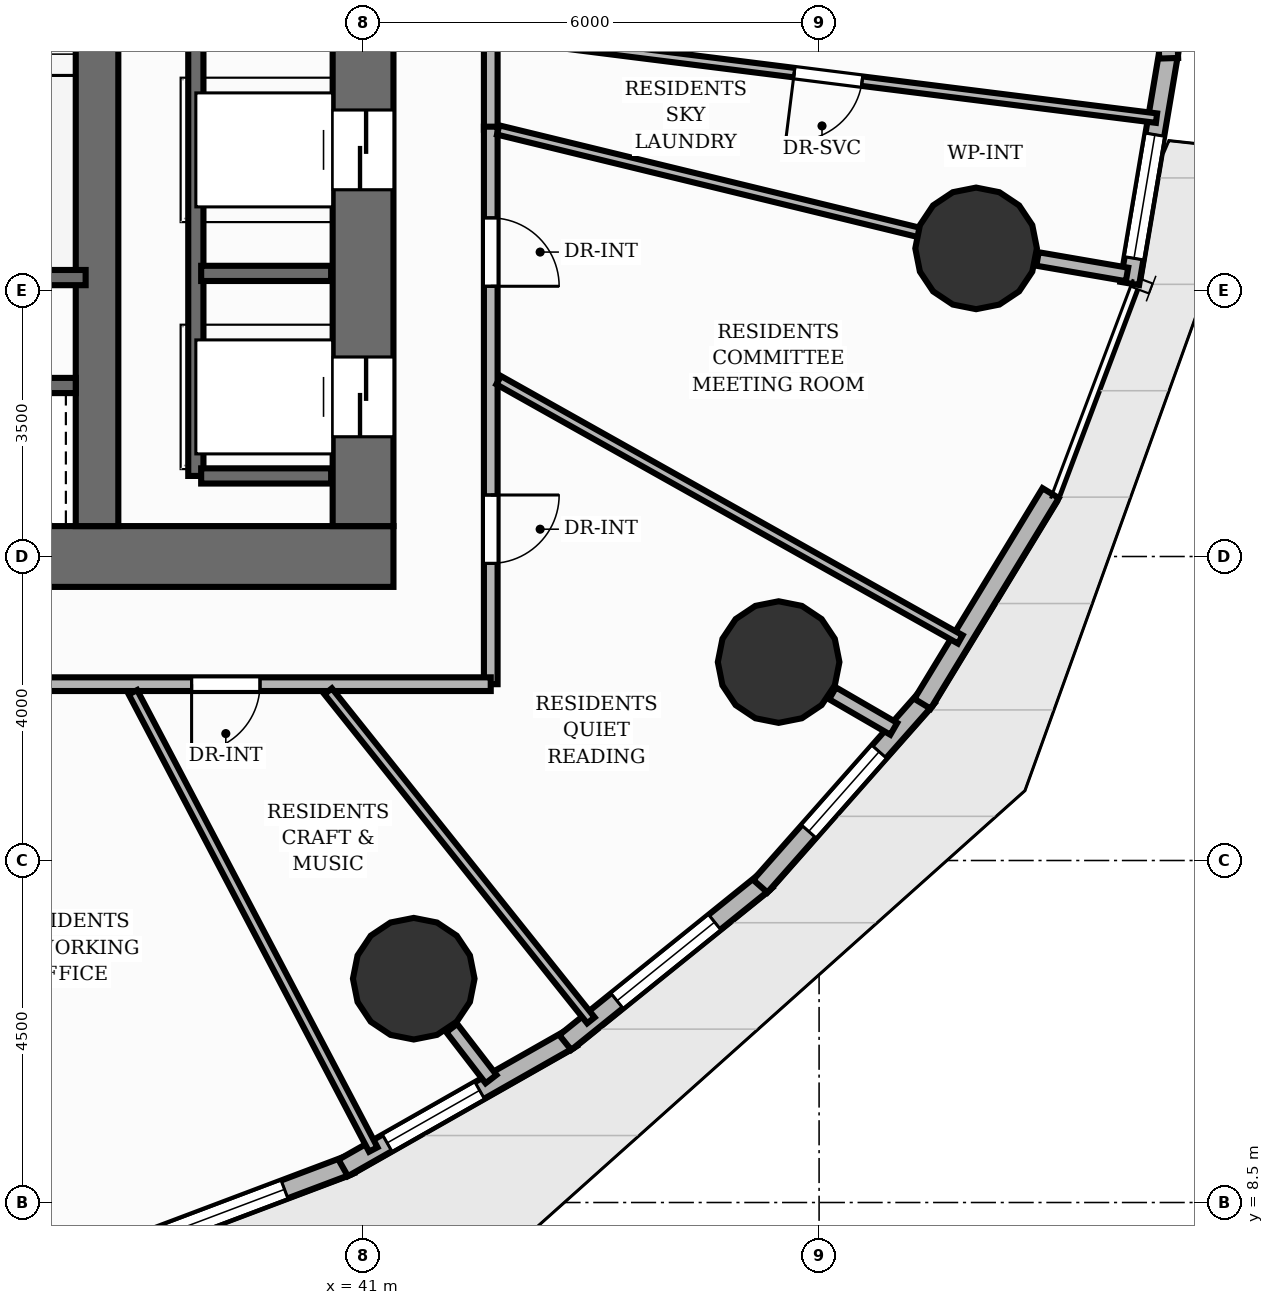
"""IFC4 building model, lengths in metres.
Left out: names, types, materials, properties, quantities, classifications, styles, units other than length and angle.
Written with IfcOpenShell. Run it as: python <this file> out.ifc"""

import sys

from ifc_helpers import new_model, si_unit, direction, frame, frame_2d, origin, origin_2d, place, context, subcontext, project, spatial, rectangle, circle, extrude, element, fill, save


model = new_model("IFC4")
c1 = context("Model", 3, precision=1e-05, world=origin(), true_north=direction((0.0, 1.0)))
c2 = subcontext(c1, "Body", "Model", "MODEL_VIEW")
j1 = project(units=[si_unit("LENGTHUNIT", "METRE"), si_unit("PLANEANGLEUNIT", "RADIAN")], contexts=[c1])
p1 = place(None, origin())
s1 = spatial("IfcSite", under=j1, at=p1, CompositionType="ELEMENT")
p2 = place(p1, origin())
s2 = spatial("IfcBuilding", under=s1, at=p2, CompositionType="ELEMENT")
p3 = place(p2, frame((0.0, 0.0, 40.8)))
s3 = spatial("IfcBuildingStorey", under=s2, at=p3, CompositionType="ELEMENT", Elevation=40.8)
p4 = place(p3, frame((22.6, 17.0, 0.0), z_axis=(0.0, 0.0, 1.0), x_axis=(1.0, 0.0, 0.0)))
e1 = element("IfcWall", 1, at=p4, inside=s3, PredefinedType="SHEAR", context=c2, shape_type="SweptSolid", body=[
    extrude(rectangle(XDim=18.8, YDim=0.8, at=frame_2d((9.4, 0.0))), origin(), (0.0, 0.0, 1.0), 3.2),
])
p5 = place(p4, frame((5.9, 0.0, 0.0)))
e2 = element("IfcOpeningElement", 2, at=p5, cuts=e1, PredefinedType="OPENING", context=c2, shape_type="SweptSolid", body=[
    extrude(rectangle(XDim=1.1, YDim=2.15, at=frame_2d((0.55, 1.075))), frame((0.0, 0.41, 0.0), z_axis=(0.0, -1.0, 0.0), x_axis=(1.0, 0.0, 0.0)), (0.0, 0.0, 1.0), 0.82),
])
p6 = place(p4, frame((9.45, 0.0, 0.0)))
e3 = element("IfcOpeningElement", 3, at=p6, cuts=e1, PredefinedType="OPENING", context=c2, shape_type="SweptSolid", body=[
    extrude(rectangle(XDim=0.9, YDim=2.1, at=frame_2d((0.45, 1.05))), frame((0.0, 0.41, 0.0), z_axis=(0.0, -1.0, 0.0), x_axis=(1.0, 0.0, 0.0)), (0.0, 0.0, 1.0), 0.82),
])
p7 = place(p3, frame((41.0, 17.4, 0.0), z_axis=(0.0, 0.0, 1.0), x_axis=(0.0, 1.0, 0.0)))
e4 = element("IfcWall", 4, at=p7, inside=s3, PredefinedType="SHEAR", context=c2, shape_type="SweptSolid", body=[
    extrude(rectangle(XDim=13.2, YDim=0.8, at=frame_2d((6.6, 0.0))), origin(), (0.0, 0.0, 1.0), 3.2),
])
p8 = place(p7, frame((1.175, 0.0, 0.0)))
e5 = element("IfcOpeningElement", 5, at=p8, cuts=e4, PredefinedType="OPENING", context=c2, shape_type="SweptSolid", body=[
    extrude(rectangle(XDim=1.05, YDim=2.15, at=frame_2d((0.525, 1.075))), frame((0.0, 0.41, 0.0), z_axis=(0.0, -1.0, 0.0), x_axis=(1.0, 0.0, 0.0)), (0.0, 0.0, 1.0), 0.82),
])
p9 = place(p7, frame((4.425, 0.0, 0.0)))
e6 = element("IfcOpeningElement", 6, at=p9, cuts=e4, PredefinedType="OPENING", context=c2, shape_type="SweptSolid", body=[
    extrude(rectangle(XDim=1.05, YDim=2.15, at=frame_2d((0.525, 1.075))), frame((0.0, 0.41, 0.0), z_axis=(0.0, -1.0, 0.0), x_axis=(1.0, 0.0, 0.0)), (0.0, 0.0, 1.0), 0.82),
])
p10 = place(p7, frame((7.725, 0.0, 0.0)))
e7 = element("IfcOpeningElement", 7, at=p10, cuts=e4, PredefinedType="OPENING", context=c2, shape_type="SweptSolid", body=[
    extrude(rectangle(XDim=1.05, YDim=2.15, at=frame_2d((0.525, 1.075))), frame((0.0, 0.41, 0.0), z_axis=(0.0, -1.0, 0.0), x_axis=(1.0, 0.0, 0.0)), (0.0, 0.0, 1.0), 0.82),
])
p11 = place(p7, frame((10.975, 0.0, 0.0)))
e8 = element("IfcOpeningElement", 8, at=p11, cuts=e4, PredefinedType="OPENING", context=c2, shape_type="SweptSolid", body=[
    extrude(rectangle(XDim=1.05, YDim=2.15, at=frame_2d((0.525, 1.075))), frame((0.0, 0.41, 0.0), z_axis=(0.0, -1.0, 0.0), x_axis=(1.0, 0.0, 0.0)), (0.0, 0.0, 1.0), 0.82),
])
p12 = place(p3, frame((37.5, 17.4, 0.0), z_axis=(0.0, 0.0, 1.0), x_axis=(0.0, 1.0, 0.0)))
e9 = element("IfcWall", 9, at=p12, inside=s3, PredefinedType="SHEAR", context=c2, shape_type="SweptSolid", body=[
    extrude(rectangle(XDim=13.2, YDim=0.56, at=frame_2d((6.6, 0.0))), origin(), (0.0, 0.0, 1.0), 3.2),
])
for number, where, z_axis, x_axis in (
    (10, (41.667, 11.445, 0.0), (0.0, 0.0, 1.0), (1.0, 0.0, 0.0)),
    (11, (46.468, 15.611, 0.0), (0.0, 0.0, 1.0), (1.0, 0.0, 0.0)),
    (12, (49.066, 21.054, 0.0), (0.0, 0.0, 1.0), (1.0, 0.0, 0.0)),
):
    element("IfcColumn", number, at=place(p3, frame(where, z_axis=z_axis, x_axis=x_axis)), inside=s3, PredefinedType="COLUMN", context=c2, shape_type="SweptSolid", body=[
        extrude(circle(Radius=0.8, at=origin_2d()), origin(), (0.0, 0.0, 1.0), 3.2),
    ])
p13 = place(p3, frame((40.838, 9.001, 0.0), z_axis=(0.0, 0.0, 1.0), x_axis=(-0.935679231508, -0.352851775857, 0.0)))
e13 = element("IfcWall", 13, at=p13, inside=s3, PredefinedType="SOLIDWALL", context=c2, shape_type="SweptSolid", body=[
    extrude(rectangle(XDim=3.513, YDim=0.25, at=frame_2d((1.756, 0.0))), origin(), (0.0, 0.0, 1.0), 2.96),
])
p14 = place(p13, frame((0.931, 0.0, 0.85)))
e14 = element("IfcOpeningElement", 14, at=p14, cuts=e13, PredefinedType="OPENING", context=c2, shape_type="SweptSolid", body=[
    extrude(rectangle(XDim=1.65, YDim=1.55, at=frame_2d((0.825, 0.775))), frame((0.0, 0.135, 0.0), z_axis=(0.0, -1.0, 0.0), x_axis=(1.0, 0.0, 0.0)), (0.0, 0.0, 1.0), 0.27),
])
p15 = place(p3, frame((43.751, 10.667, 0.0), z_axis=(0.0, 0.0, 1.0), x_axis=(-0.869389832426, -0.494126825091, 0.0)))
e15 = element("IfcWall", 15, at=p15, inside=s3, PredefinedType="SOLIDWALL", context=c2, shape_type="SweptSolid", body=[
    extrude(rectangle(XDim=3.465, YDim=0.25, at=frame_2d((1.732, 0.0))), origin(), (0.0, 0.0, 1.0), 2.96),
])
p16 = place(p15, frame((1.4, 0.0, 0.85)))
e16 = element("IfcOpeningElement", 16, at=p16, cuts=e15, PredefinedType="OPENING", context=c2, shape_type="SweptSolid", body=[
    extrude(rectangle(XDim=1.4, YDim=1.29, at=frame_2d((0.7, 0.645))), frame((0.0, 0.135, 0.0), z_axis=(0.0, -1.0, 0.0), x_axis=(1.0, 0.0, 0.0)), (0.0, 0.0, 1.0), 0.27),
])
p17 = place(p3, frame((46.307, 12.739, 0.0), z_axis=(0.0, 0.0, 1.0), x_axis=(-0.778586232895, -0.627537630701, 0.0)))
e17 = element("IfcWall", 17, at=p17, inside=s3, PredefinedType="SOLIDWALL", context=c2, shape_type="SweptSolid", body=[
    extrude(rectangle(XDim=3.399, YDim=0.25, at=frame_2d((1.7, 0.0))), origin(), (0.0, 0.0, 1.0), 2.96),
])
p18 = place(p17, frame((0.875, 0.0, 0.85)))
e18 = element("IfcOpeningElement", 18, at=p18, cuts=e17, PredefinedType="OPENING", context=c2, shape_type="SweptSolid", body=[
    extrude(rectangle(XDim=1.65, YDim=1.55, at=frame_2d((0.825, 0.775))), frame((0.0, 0.135, 0.0), z_axis=(0.0, -1.0, 0.0), x_axis=(1.0, 0.0, 0.0)), (0.0, 0.0, 1.0), 0.27),
])
p19 = place(p3, frame((48.427, 15.152, 0.0), z_axis=(0.0, 0.0, 1.0), x_axis=(-0.662112398544, -0.749404544751, 0.0)))
e19 = element("IfcWall", 19, at=p19, inside=s3, PredefinedType="SOLIDWALL", context=c2, shape_type="SweptSolid", body=[
    extrude(rectangle(XDim=3.323, YDim=0.25, at=frame_2d((1.661, 0.0))), origin(), (0.0, 0.0, 1.0), 2.96),
])
p20 = place(p19, frame((0.961, 0.0, 0.85)))
e20 = element("IfcOpeningElement", 20, at=p20, cuts=e19, PredefinedType="OPENING", context=c2, shape_type="SweptSolid", body=[
    extrude(rectangle(XDim=1.4, YDim=1.55, at=frame_2d((0.7, 0.775))), frame((0.0, 0.135, 0.0), z_axis=(0.0, -1.0, 0.0), x_axis=(1.0, 0.0, 0.0)), (0.0, 0.0, 1.0), 0.27),
])
p21 = place(p3, frame((50.046, 17.834, 0.0), z_axis=(0.0, 0.0, 1.0), x_axis=(-0.519753566346, -0.854316235519, 0.0)))
e21 = element("IfcWall", 21, at=p21, inside=s3, PredefinedType="SOLIDWALL", context=c2, shape_type="SweptSolid", body=[
    extrude(rectangle(XDim=3.244, YDim=0.25, at=frame_2d((1.622, 0.0))), origin(), (0.0, 0.0, 1.0), 2.96),
])
p22 = place(p3, frame((51.607, 23.67, 0.0), z_axis=(0.0, 0.0, 1.0), x_axis=(-0.166403122634, -0.98605780803, 0.0)))
e22 = element("IfcWall", 22, at=p22, inside=s3, PredefinedType="SOLIDWALL", context=c2, shape_type="SweptSolid", body=[
    extrude(rectangle(XDim=3.121, YDim=0.25, at=frame_2d((1.56, 0.0))), origin(), (0.0, 0.0, 1.0), 2.96),
])
p23 = place(p22, frame((1.135, 0.0, 0.85)))
e23 = element("IfcOpeningElement", 23, at=p23, cuts=e22, PredefinedType="OPENING", context=c2, shape_type="SweptSolid", body=[
    extrude(rectangle(XDim=1.65, YDim=1.29, at=frame_2d((0.825, 0.645))), frame((0.0, 0.135, 0.0), z_axis=(0.0, -1.0, 0.0), x_axis=(1.0, 0.0, 0.0)), (0.0, 0.0, 1.0), 0.27),
])
p24 = place(p3, frame((51.501, 26.646, 0.0), z_axis=(0.0, 0.0, 1.0), x_axis=(0.031584802517, -0.999501075662, 0.0)))
e24 = element("IfcWall", 24, at=p24, inside=s3, PredefinedType="SOLIDWALL", context=c2, shape_type="SweptSolid", body=[
    extrude(rectangle(XDim=3.092, YDim=0.25, at=frame_2d((1.546, 0.0))), origin(), (0.0, 0.0, 1.0), 2.96),
])
p25 = place(p24, frame((0.721, 0.0, 0.85)))
e25 = element("IfcOpeningElement", 25, at=p25, cuts=e24, PredefinedType="OPENING", context=c2, shape_type="SweptSolid", body=[
    extrude(rectangle(XDim=1.65, YDim=1.55, at=frame_2d((0.825, 0.775))), frame((0.0, 0.135, 0.0), z_axis=(0.0, -1.0, 0.0), x_axis=(1.0, 0.0, 0.0)), (0.0, 0.0, 1.0), 0.27),
])
p26 = place(p3, frame((34.11, 20.67, 0.0), z_axis=(0.0, 0.0, 1.0), x_axis=(1.0, 0.0, 0.0)))
e26 = element("IfcWall", 26, at=p26, inside=s3, PredefinedType="SHEAR", context=c2, shape_type="SweptSolid", body=[
    extrude(rectangle(XDim=3.24, YDim=0.2, at=frame_2d((1.62, 0.0))), origin(), (0.0, 0.0, 1.0), 3.2),
])
p27 = place(p3, frame((38.8, 18.06, 0.0), z_axis=(0.0, 0.0, 1.0), x_axis=(0.0, 1.0, 0.0)))
e27 = element("IfcWall", 27, at=p27, inside=s3, PredefinedType="SHEAR", context=c2, shape_type="SweptSolid", body=[
    extrude(rectangle(XDim=11.88, YDim=0.2, at=frame_2d((5.94, 0.0))), origin(), (0.0, 0.0, 1.0), 3.2),
])
for number, where, z_axis, x_axis in (
    (28, (38.87, 18.06, 0.0), (0.0, 0.0, 1.0), (1.0, 0.0, 0.0)),
    (29, (38.87, 20.725, 0.0), (0.0, 0.0, 1.0), (1.0, 0.0, 0.0)),
):
    element("IfcWall", number, at=place(p3, frame(where, z_axis=z_axis, x_axis=x_axis)), inside=s3, PredefinedType="SHEAR", context=c2, shape_type="SweptSolid", body=[
        extrude(rectangle(XDim=1.71, YDim=0.2, at=frame_2d((0.855, 0.0))), origin(), (0.0, 0.0, 1.0), 3.2),
    ])
p28 = place(p3, frame((33.5, 19.25, 0.0), z_axis=(0.0, 0.0, 1.0), x_axis=(1.0, 0.0, 0.0)))
e30 = element("IfcWall", 30, at=p28, inside=s3, PredefinedType="SHEAR", context=c2, shape_type="SweptSolid", body=[
    extrude(rectangle(XDim=3.72, YDim=0.2, at=frame_2d((1.86, 0.0))), origin(), (0.0, 0.0, 1.0), 3.2),
])
p29 = place(p3, frame((42.167, 10.795, 0.0), z_axis=(0.0, 0.0, 1.0), x_axis=(0.609822176225, -0.792538272504, 0.0)))
e31 = element("IfcWall", 31, at=p29, inside=s3, PredefinedType="PARTITIONING", context=c2, shape_type="SweptSolid", body=[
    extrude(rectangle(XDim=0.847, YDim=0.18, at=frame_2d((0.424, 0.0))), origin(), (0.0, 0.0, 1.0), 2.178),
])
p30 = place(p3, frame((47.177, 15.2, 0.0), z_axis=(0.0, 0.0, 1.0), x_axis=(0.864965183009, -0.501831876411, 0.0)))
e32 = element("IfcWall", 32, at=p30, inside=s3, PredefinedType="PARTITIONING", context=c2, shape_type="SweptSolid", body=[
    extrude(rectangle(XDim=0.931, YDim=0.18, at=frame_2d((0.466, 0.0))), origin(), (0.0, 0.0, 1.0), 2.178),
])
p31 = place(p3, frame((49.874, 20.915, 0.0), z_axis=(0.0, 0.0, 1.0), x_axis=(0.98541644509, -0.170160012181, 0.0)))
e33 = element("IfcWall", 33, at=p31, inside=s3, PredefinedType="PARTITIONING", context=c2, shape_type="SweptSolid", body=[
    extrude(rectangle(XDim=1.195, YDim=0.18, at=frame_2d((0.598, 0.0))), origin(), (0.0, 0.0, 1.0), 2.178),
])
p32 = place(p3, frame((42.68, 32.68, 0.0), z_axis=(0.0, 0.0, 1.0), x_axis=(0.0, -1.0, 0.0)))
e34 = element("IfcWall", 34, at=p32, inside=s3, PredefinedType="PARTITIONING", context=c2, shape_type="SweptSolid", body=[
    extrude(rectangle(XDim=10.065, YDim=0.18, at=frame_2d((5.032, 0.0))), origin(), (0.0, 0.0, 1.0), 2.955),
])
p33 = place(p32, frame((7.374, 0.0, 0.0)))
e35 = element("IfcOpeningElement", 35, at=p33, cuts=e34, PredefinedType="OPENING", context=c2, shape_type="SweptSolid", body=[
    extrude(rectangle(XDim=0.9, YDim=2.1, at=frame_2d((0.45, 1.05))), frame((0.0, 0.1, 0.0), z_axis=(0.0, -1.0, 0.0), x_axis=(1.0, 0.0, 0.0)), (0.0, 0.0, 1.0), 0.2),
])
p34 = place(p3, frame((42.68, 22.656, 0.0), z_axis=(0.0, 0.0, 1.0), x_axis=(0.0, -1.0, 0.0)))
e36 = element("IfcWall", 36, at=p34, inside=s3, PredefinedType="PARTITIONING", context=c2, shape_type="SweptSolid", body=[
    extrude(rectangle(XDim=7.335, YDim=0.18, at=frame_2d((3.668, 0.0))), origin(), (0.0, 0.0, 1.0), 2.955),
])
p35 = place(p34, frame((1.2, 0.0, 0.0)))
e37 = element("IfcOpeningElement", 37, at=p35, cuts=e36, PredefinedType="OPENING", context=c2, shape_type="SweptSolid", body=[
    extrude(rectangle(XDim=0.9, YDim=2.1, at=frame_2d((0.45, 1.05))), frame((0.0, 0.1, 0.0), z_axis=(0.0, -1.0, 0.0), x_axis=(1.0, 0.0, 0.0)), (0.0, 0.0, 1.0), 0.2),
])
p36 = place(p34, frame((4.846, 0.0, 0.0)))
e38 = element("IfcOpeningElement", 38, at=p36, cuts=e36, PredefinedType="OPENING", context=c2, shape_type="SweptSolid", body=[
    extrude(rectangle(XDim=0.9, YDim=2.1, at=frame_2d((0.45, 1.05))), frame((0.0, 0.1, 0.0), z_axis=(0.0, -1.0, 0.0), x_axis=(1.0, 0.0, 0.0)), (0.0, 0.0, 1.0), 0.2),
])
p37 = place(p3, frame((42.68, 15.32, 0.0), z_axis=(0.0, 0.0, 1.0), x_axis=(-1.0, 0.0, 0.0)))
e39 = element("IfcWall", 39, at=p37, inside=s3, PredefinedType="PARTITIONING", context=c2, shape_type="SweptSolid", body=[
    extrude(rectangle(XDim=21.36, YDim=0.18, at=frame_2d((10.68, 0.0))), origin(), (0.0, 0.0, 1.0), 2.955),
])
p38 = place(p37, frame((3.036, 0.0, 0.0)))
e40 = element("IfcOpeningElement", 40, at=p38, cuts=e39, PredefinedType="OPENING", context=c2, shape_type="SweptSolid", body=[
    extrude(rectangle(XDim=0.9, YDim=2.1, at=frame_2d((0.45, 1.05))), frame((0.0, 0.1, 0.0), z_axis=(0.0, -1.0, 0.0), x_axis=(1.0, 0.0, 0.0)), (0.0, 0.0, 1.0), 0.2),
])
p39 = place(p37, frame((6.275, 0.0, 0.0)))
e41 = element("IfcOpeningElement", 41, at=p39, cuts=e39, PredefinedType="OPENING", context=c2, shape_type="SweptSolid", body=[
    extrude(rectangle(XDim=0.9, YDim=2.1, at=frame_2d((0.45, 1.05))), frame((0.0, 0.1, 0.0), z_axis=(0.0, -1.0, 0.0), x_axis=(1.0, 0.0, 0.0)), (0.0, 0.0, 1.0), 0.2),
])
p40 = place(p37, frame((14.49, 0.0, 0.0)))
e42 = element("IfcOpeningElement", 42, at=p40, cuts=e39, PredefinedType="OPENING", context=c2, shape_type="SweptSolid", body=[
    extrude(rectangle(XDim=1.05, YDim=2.15, at=frame_2d((0.525, 1.075))), frame((0.0, 0.1, 0.0), z_axis=(0.0, -1.0, 0.0), x_axis=(1.0, 0.0, 0.0)), (0.0, 0.0, 1.0), 0.2),
])
p41 = place(p3, frame((51.439, 22.768, 0.0), z_axis=(0.0, 0.0, 1.0), x_axis=(-0.992204813033, 0.124617851825, 0.0)))
e43 = element("IfcWall", 43, at=p41, inside=s3, PredefinedType="PARTITIONING", context=c2, shape_type="SweptSolid", body=[
    extrude(rectangle(XDim=8.708, YDim=0.125, at=frame_2d((4.354, 0.0))), origin(), (0.0, 0.0, 1.0), 2.641),
])
p42 = place(p41, frame((3.904, 0.0, 0.0)))
e44 = element("IfcOpeningElement", 44, at=p42, cuts=e43, PredefinedType="OPENING", context=c2, shape_type="SweptSolid", body=[
    extrude(rectangle(XDim=0.9, YDim=2.1, at=frame_2d((0.45, 1.05))), frame((0.0, 0.073, 0.0), z_axis=(0.0, -1.0, 0.0), x_axis=(1.0, 0.0, 0.0)), (0.0, 0.0, 1.0), 0.145),
])
p43 = place(p3, frame((48.858, 15.909, 0.0), z_axis=(0.0, 0.0, 1.0), x_axis=(-0.871931019114, 0.489628734764, 0.0)))
e45 = element("IfcWall", 45, at=p43, inside=s3, PredefinedType="PARTITIONING", context=c2, shape_type="SweptSolid", body=[
    extrude(rectangle(XDim=6.965, YDim=0.125, at=frame_2d((3.483, 0.0))), origin(), (0.0, 0.0, 1.0), 2.641),
])
p44 = place(p3, frame((42.777, 22.612, 0.0), z_axis=(0.0, 0.0, 1.0), x_axis=(0.971633604644, -0.236491307083, 0.0)))
e46 = element("IfcWall", 46, at=p44, inside=s3, PredefinedType="PARTITIONING", context=c2, shape_type="SweptSolid", body=[
    extrude(rectangle(XDim=5.707, YDim=0.125, at=frame_2d((2.854, 0.0))), origin(), (0.0, 0.0, 1.0), 2.178),
])
p45 = place(p3, frame((43.998, 10.897, 0.0), z_axis=(0.0, 0.0, 1.0), x_axis=(-0.623937025269, 0.781474624347, 0.0)))
e47 = element("IfcWall", 47, at=p45, inside=s3, PredefinedType="PARTITIONING", context=c2, shape_type="SweptSolid", body=[
    extrude(rectangle(XDim=5.54, YDim=0.125, at=frame_2d((2.77, 0.0))), origin(), (0.0, 0.0, 1.0), 2.955),
])
p46 = place(p3, frame((41.135, 9.197, 0.0), z_axis=(0.0, 0.0, 1.0), x_axis=(-0.465197105493, 0.885207124373, 0.0)))
e48 = element("IfcWall", 48, at=p46, inside=s3, PredefinedType="PARTITIONING", context=c2, shape_type="SweptSolid", body=[
    extrude(rectangle(XDim=6.797, YDim=0.125, at=frame_2d((3.398, 0.0))), origin(), (0.0, 0.0, 1.0), 2.955),
])
p47 = place(p14, origin())
e49 = element("IfcWindow", 49, at=p47, inside=s3, PartitioningType="SINGLE_PANEL", PredefinedType="WINDOW", context=c2, shape_type="SweptSolid", body=[
    extrude(rectangle(XDim=1.65, YDim=1.55, at=frame_2d((0.825, 0.775))), frame((0.0, 0.03, 0.0), z_axis=(0.0, -1.0, 0.0), x_axis=(1.0, 0.0, 0.0)), (0.0, 0.0, 1.0), 0.06),
])
fill(e14, e49)
p48 = place(p16, origin())
e50 = element("IfcWindow", 50, at=p48, inside=s3, PartitioningType="SINGLE_PANEL", PredefinedType="WINDOW", context=c2, shape_type="SweptSolid", body=[
    extrude(rectangle(XDim=1.4, YDim=1.29, at=frame_2d((0.7, 0.645))), frame((0.0, 0.03, 0.0), z_axis=(0.0, -1.0, 0.0), x_axis=(1.0, 0.0, 0.0)), (0.0, 0.0, 1.0), 0.06),
])
fill(e16, e50)
p49 = place(p18, origin())
e51 = element("IfcWindow", 51, at=p49, inside=s3, PartitioningType="SINGLE_PANEL", PredefinedType="WINDOW", context=c2, shape_type="SweptSolid", body=[
    extrude(rectangle(XDim=1.65, YDim=1.55, at=frame_2d((0.825, 0.775))), frame((0.0, 0.03, 0.0), z_axis=(0.0, -1.0, 0.0), x_axis=(1.0, 0.0, 0.0)), (0.0, 0.0, 1.0), 0.06),
])
fill(e18, e51)
p50 = place(p20, origin())
e52 = element("IfcWindow", 52, at=p50, inside=s3, PartitioningType="SINGLE_PANEL", PredefinedType="WINDOW", context=c2, shape_type="SweptSolid", body=[
    extrude(rectangle(XDim=1.4, YDim=1.55, at=frame_2d((0.7, 0.775))), frame((0.0, 0.03, 0.0), z_axis=(0.0, -1.0, 0.0), x_axis=(1.0, 0.0, 0.0)), (0.0, 0.0, 1.0), 0.06),
])
fill(e20, e52)
p51 = place(p23, origin())
e53 = element("IfcWindow", 53, at=p51, inside=s3, PartitioningType="SINGLE_PANEL", PredefinedType="WINDOW", context=c2, shape_type="SweptSolid", body=[
    extrude(rectangle(XDim=1.65, YDim=1.29, at=frame_2d((0.825, 0.645))), frame((0.0, 0.03, 0.0), z_axis=(0.0, -1.0, 0.0), x_axis=(1.0, 0.0, 0.0)), (0.0, 0.0, 1.0), 0.06),
])
fill(e23, e53)
p52 = place(p8, origin())
e54 = element("IfcDoor", 54, at=p52, inside=s3, OperationType="DOUBLE_DOOR_SLIDING", PredefinedType="DOOR", context=c2, shape_type="SweptSolid", body=[
    extrude(rectangle(XDim=1.05, YDim=2.15, at=frame_2d((0.525, 1.075))), frame((0.0, 0.025, 0.0), z_axis=(0.0, -1.0, 0.0), x_axis=(1.0, 0.0, 0.0)), (0.0, 0.0, 1.0), 0.05),
])
fill(e5, e54)
p53 = place(p9, origin())
e55 = element("IfcDoor", 55, at=p53, inside=s3, OperationType="DOUBLE_DOOR_SLIDING", PredefinedType="DOOR", context=c2, shape_type="SweptSolid", body=[
    extrude(rectangle(XDim=1.05, YDim=2.15, at=frame_2d((0.525, 1.075))), frame((0.0, 0.025, 0.0), z_axis=(0.0, -1.0, 0.0), x_axis=(1.0, 0.0, 0.0)), (0.0, 0.0, 1.0), 0.05),
])
fill(e6, e55)
p54 = place(p35, origin())
e56 = element("IfcDoor", 56, at=p54, inside=s3, OperationType="SINGLE_SWING_RIGHT", PredefinedType="DOOR", context=c2, shape_type="SweptSolid", body=[
    extrude(rectangle(XDim=0.9, YDim=2.1, at=frame_2d((0.45, 1.05))), frame((0.0, 0.025, 0.0), z_axis=(0.0, -1.0, 0.0), x_axis=(1.0, 0.0, 0.0)), (0.0, 0.0, 1.0), 0.05),
])
fill(e37, e56)
p55 = place(p36, origin())
e57 = element("IfcDoor", 57, at=p55, inside=s3, OperationType="SINGLE_SWING_LEFT", PredefinedType="DOOR", context=c2, shape_type="SweptSolid", body=[
    extrude(rectangle(XDim=0.9, YDim=2.1, at=frame_2d((0.45, 1.05))), frame((0.0, 0.025, 0.0), z_axis=(0.0, -1.0, 0.0), x_axis=(1.0, 0.0, 0.0)), (0.0, 0.0, 1.0), 0.05),
])
fill(e38, e57)
p56 = place(p38, origin())
e58 = element("IfcDoor", 58, at=p56, inside=s3, OperationType="SINGLE_SWING_RIGHT", PredefinedType="DOOR", context=c2, shape_type="SweptSolid", body=[
    extrude(rectangle(XDim=0.9, YDim=2.1, at=frame_2d((0.45, 1.05))), frame((0.0, 0.025, 0.0), z_axis=(0.0, -1.0, 0.0), x_axis=(1.0, 0.0, 0.0)), (0.0, 0.0, 1.0), 0.05),
])
fill(e40, e58)
p57 = place(p42, origin())
e59 = element("IfcDoor", 59, at=p57, inside=s3, OperationType="SINGLE_SWING_RIGHT", PredefinedType="DOOR", context=c2, shape_type="SweptSolid", body=[
    extrude(rectangle(XDim=0.9, YDim=2.1, at=frame_2d((0.45, 1.05))), frame((0.0, 0.025, 0.0), z_axis=(0.0, -1.0, 0.0), x_axis=(1.0, 0.0, 0.0)), (0.0, 0.0, 1.0), 0.05),
])
fill(e44, e59)
save(model, sys.argv[1])
